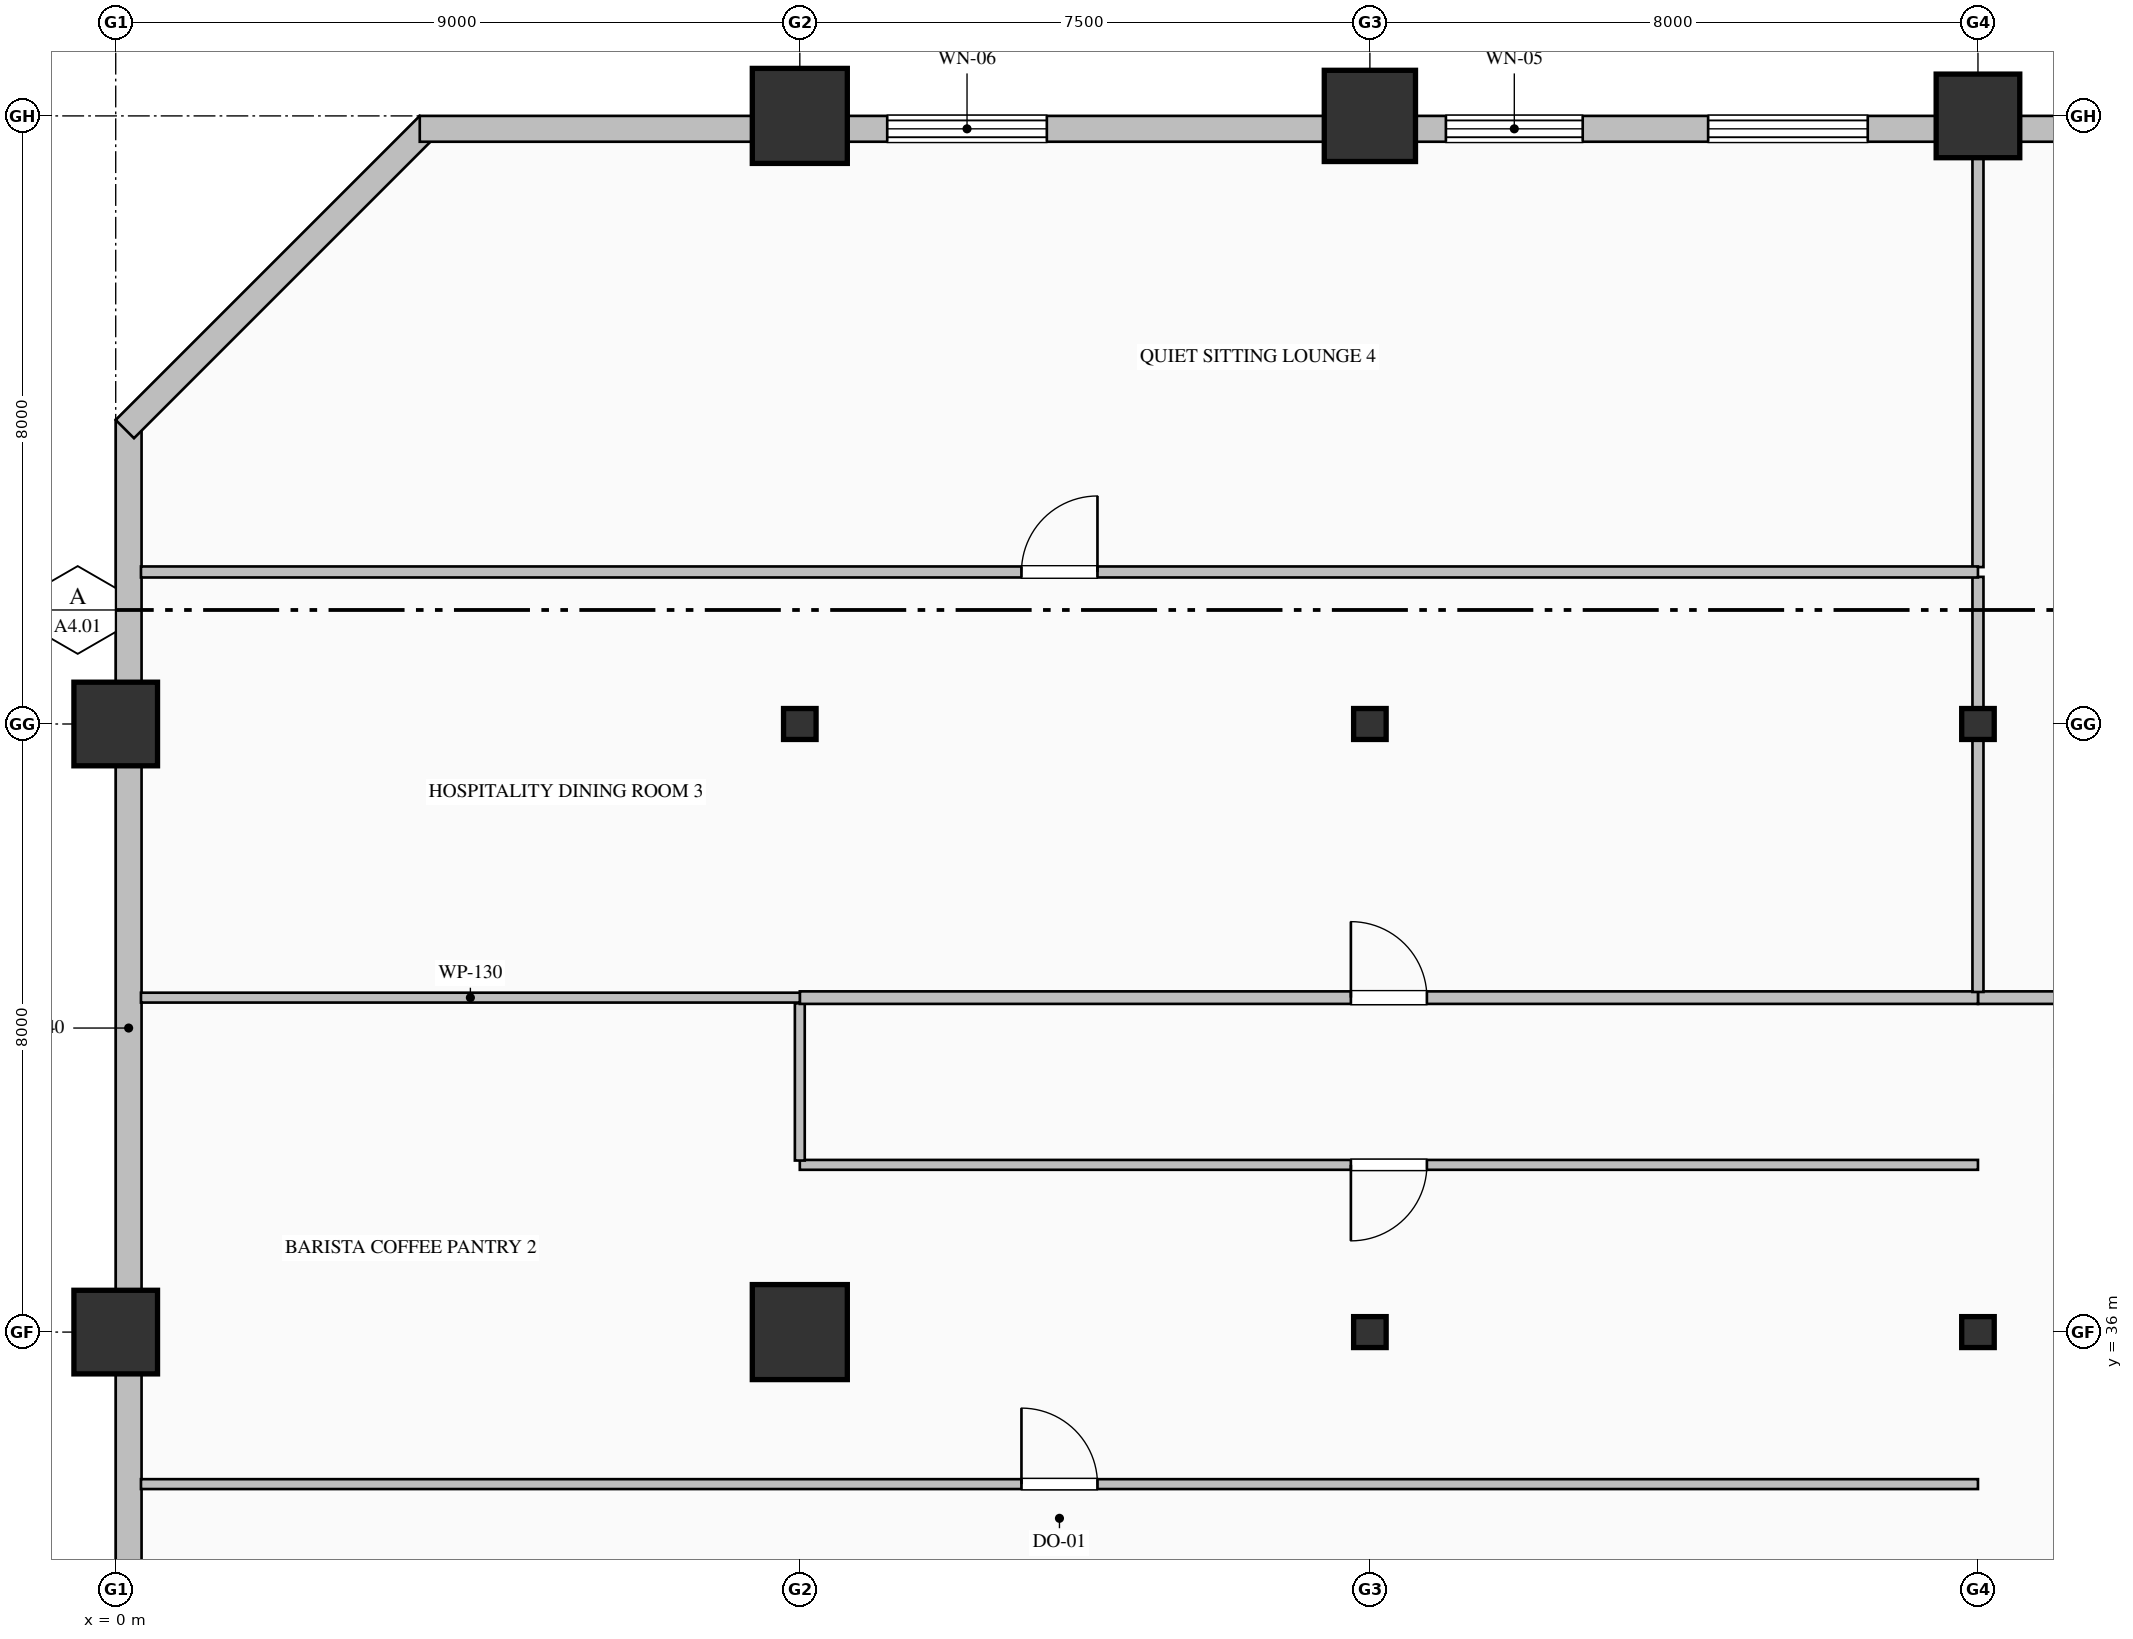
"""IFC4 building model, lengths in metres.
Left out: names, types, materials, properties, quantities, classifications, styles, units other than length and angle.
Written with IfcOpenShell. Run it as: python <this file> out.ifc"""

import sys

from ifc_helpers import new_model, si_unit, direction, frame, frame_2d, origin, origin_2d, place, context, subcontext, project, spatial, rectangle, hollow_rectangle, hollow_circle, i_section, extrude, element, fill, save


model = new_model("IFC4")
c1 = context("Model", 3, precision=1e-05, world=origin(), true_north=direction((0.0, 1.0)))
c2 = subcontext(c1, "Body", "Model", "MODEL_VIEW")
j1 = project(units=[si_unit("LENGTHUNIT", "METRE"), si_unit("PLANEANGLEUNIT", "RADIAN")], contexts=[c1])
p1 = place(None, origin())
s1 = spatial("IfcSite", under=j1, at=p1, CompositionType="ELEMENT")
p2 = place(p1, origin())
s2 = spatial("IfcBuilding", under=s1, at=p2, CompositionType="ELEMENT")
p3 = place(p2, frame((0.0, 0.0, 68.2)))
s3 = spatial("IfcBuildingStorey", under=s2, at=p3, CompositionType="ELEMENT", Elevation=68.2)
for number, where, z_axis, x_axis in (
    (1, (0.0, 36.0, 0.0), (0.0, 0.0, 1.0), (1.0, 0.0, 0.0)),
    (2, (0.0, 44.0, 0.0), (0.0, 0.0, 1.0), (1.0, 0.0, 0.0)),
):
    element("IfcColumn", number, at=place(p3, frame(where, z_axis=z_axis, x_axis=x_axis)), inside=s3, PredefinedType="COLUMN", context=c2, shape_type="SweptSolid", body=[
        extrude(hollow_rectangle(XDim=1.1, YDim=1.1, WallThickness=0.04, at=origin_2d()), origin(), (0.0, 0.0, 1.0), 4.0),
    ])
p4 = place(p3, frame((9.0, 36.0, 0.0), z_axis=(0.0, 0.0, 1.0), x_axis=(1.0, 0.0, 0.0)))
e3 = element("IfcColumn", 3, at=p4, inside=s3, PredefinedType="COLUMN", context=c2, shape_type="SweptSolid", body=[
    extrude(hollow_rectangle(XDim=1.25, YDim=1.25, WallThickness=0.045, at=origin_2d()), origin(), (0.0, 0.0, 1.0), 4.0),
])
p5 = place(p3, frame((9.0, 44.0, 0.0), z_axis=(0.0, 0.0, 1.0), x_axis=(1.0, 0.0, 0.0)))
e4 = element("IfcColumn", 4, at=p5, inside=s3, PredefinedType="COLUMN", context=c2, shape_type="SweptSolid", body=[
    extrude(i_section(OverallWidth=0.407, OverallDepth=0.428, WebThickness=0.02, FlangeThickness=0.035, FilletRadius=0.022, at=origin_2d()), origin(), (0.0, 0.0, 1.0), 4.0),
])
p6 = place(p3, frame((9.0, 52.0, 0.0), z_axis=(0.0, 0.0, 1.0), x_axis=(1.0, 0.0, 0.0)))
e5 = element("IfcColumn", 5, at=p6, inside=s3, PredefinedType="COLUMN", context=c2, shape_type="SweptSolid", body=[
    extrude(hollow_rectangle(XDim=1.25, YDim=1.25, WallThickness=0.045, at=origin_2d()), origin(), (0.0, 0.0, 1.0), 4.0),
])
for number, where, z_axis, x_axis in (
    (6, (16.5, 36.0, 0.0), (0.0, 0.0, 1.0), (1.0, 0.0, 0.0)),
    (7, (16.5, 44.0, 0.0), (0.0, 0.0, 1.0), (1.0, 0.0, 0.0)),
):
    element("IfcColumn", number, at=place(p3, frame(where, z_axis=z_axis, x_axis=x_axis)), inside=s3, PredefinedType="COLUMN", context=c2, shape_type="SweptSolid", body=[
        extrude(i_section(OverallWidth=0.407, OverallDepth=0.428, WebThickness=0.02, FlangeThickness=0.035, FilletRadius=0.022, at=origin_2d()), origin(), (0.0, 0.0, 1.0), 4.0),
    ])
p7 = place(p3, frame((16.5, 52.0, 0.0), z_axis=(0.0, 0.0, 1.0), x_axis=(1.0, 0.0, 0.0)))
e8 = element("IfcColumn", 8, at=p7, inside=s3, PredefinedType="COLUMN", context=c2, shape_type="SweptSolid", body=[
    extrude(hollow_circle(Radius=0.6, WallThickness=0.04, at=origin_2d()), origin(), (0.0, 0.0, 1.0), 4.0),
])
for number, where, z_axis, x_axis in (
    (9, (24.5, 36.0, 0.0), (0.0, 0.0, 1.0), (1.0, 0.0, 0.0)),
    (10, (24.5, 44.0, 0.0), (0.0, 0.0, 1.0), (1.0, 0.0, 0.0)),
):
    element("IfcColumn", number, at=place(p3, frame(where, z_axis=z_axis, x_axis=x_axis)), inside=s3, PredefinedType="COLUMN", context=c2, shape_type="SweptSolid", body=[
        extrude(i_section(OverallWidth=0.407, OverallDepth=0.428, WebThickness=0.02, FlangeThickness=0.035, FilletRadius=0.022, at=origin_2d()), origin(), (0.0, 0.0, 1.0), 4.0),
    ])
p8 = place(p3, frame((24.5, 52.0, 0.0), z_axis=(0.0, 0.0, 1.0), x_axis=(1.0, 0.0, 0.0)))
e11 = element("IfcColumn", 11, at=p8, inside=s3, PredefinedType="COLUMN", context=c2, shape_type="SweptSolid", body=[
    extrude(hollow_rectangle(XDim=1.1, YDim=1.1, WallThickness=0.04, at=origin_2d()), origin(), (0.0, 0.0, 1.0), 4.0),
])
p9 = place(p3, frame((0.17, 32.0, 0.0), z_axis=(0.0, 0.0, 1.0), x_axis=(0.0, 1.0, 0.0)))
e12 = element("IfcWall", 12, at=p9, inside=s3, PredefinedType="SOLIDWALL", context=c2, shape_type="SweptSolid", body=[
    extrude(rectangle(XDim=16.0, YDim=0.34, at=frame_2d((8.0, 0.0))), origin(), (0.0, 0.0, 1.0), 3.25),
])
p10 = place(p3, frame((0.12, 47.88, 0.0), z_axis=(0.0, 0.0, 1.0), x_axis=(0.707106781187, 0.707106781187, 0.0)))
e13 = element("IfcWall", 13, at=p10, inside=s3, PredefinedType="SOLIDWALL", context=c2, shape_type="SweptSolid", body=[
    extrude(rectangle(XDim=5.657, YDim=0.34, at=frame_2d((2.828, 0.0))), origin(), (0.0, 0.0, 1.0), 3.75),
])
p11 = place(p3, frame((4.0, 51.83, 0.0), z_axis=(0.0, 0.0, 1.0), x_axis=(1.0, 0.0, 0.0)))
e14 = element("IfcWall", 14, at=p11, inside=s3, PredefinedType="SOLIDWALL", context=c2, shape_type="SweptSolid", body=[
    extrude(rectangle(XDim=36.52, YDim=0.34, at=frame_2d((18.26, 0.0))), origin(), (0.0, 0.0, 1.0), 3.25),
])
p12 = place(p11, frame((6.15, 0.0, 0.85)))
e15 = element("IfcOpeningElement", 15, at=p12, cuts=e14, PredefinedType="OPENING", context=c2, shape_type="SweptSolid", body=[
    extrude(rectangle(XDim=2.1, YDim=2.05, at=frame_2d((1.05, 1.025))), frame((0.0, 0.18, 0.0), z_axis=(0.0, -1.0, 0.0), x_axis=(1.0, 0.0, 0.0)), (0.0, 0.0, 1.0), 0.36),
])
p13 = place(p11, frame((13.5, 0.0, 0.85)))
e16 = element("IfcOpeningElement", 16, at=p13, cuts=e14, PredefinedType="OPENING", context=c2, shape_type="SweptSolid", body=[
    extrude(rectangle(XDim=1.8, YDim=2.05, at=frame_2d((0.9, 1.025))), frame((0.0, 0.18, 0.0), z_axis=(0.0, -1.0, 0.0), x_axis=(1.0, 0.0, 0.0)), (0.0, 0.0, 1.0), 0.36),
])
p14 = place(p11, frame((16.95, 0.0, 0.85)))
e17 = element("IfcOpeningElement", 17, at=p14, cuts=e14, PredefinedType="OPENING", context=c2, shape_type="SweptSolid", body=[
    extrude(rectangle(XDim=2.1, YDim=2.05, at=frame_2d((1.05, 1.025))), frame((0.0, 0.18, 0.0), z_axis=(0.0, -1.0, 0.0), x_axis=(1.0, 0.0, 0.0)), (0.0, 0.0, 1.0), 0.36),
])
p15 = place(p11, frame((24.3, 0.0, 0.85)))
e18 = element("IfcOpeningElement", 18, at=p15, cuts=e14, PredefinedType="OPENING", context=c2, shape_type="SweptSolid", body=[
    extrude(rectangle(XDim=1.8, YDim=2.05, at=frame_2d((0.9, 1.025))), frame((0.0, 0.18, 0.0), z_axis=(0.0, -1.0, 0.0), x_axis=(1.0, 0.0, 0.0)), (0.0, 0.0, 1.0), 0.36),
])
p16 = place(p3, frame((24.5, 40.4, 0.0), z_axis=(0.0, 0.0, 1.0), x_axis=(1.0, 0.0, 0.0)))
e19 = element("IfcWall", 19, at=p16, inside=s3, PredefinedType="PARTITIONING", context=c2, shape_type="SweptSolid", body=[
    extrude(rectangle(XDim=13.3, YDim=0.165, at=frame_2d((6.65, 0.0))), origin(), (0.0, 0.0, 1.0), 3.75),
])
p17 = place(p16, frame((6.15, 0.0, 0.0)))
e20 = element("IfcOpeningElement", 20, at=p17, cuts=e19, PredefinedType="OPENING", context=c2, shape_type="SweptSolid", body=[
    extrude(rectangle(XDim=1.0, YDim=2.15, at=frame_2d((0.5, 1.075))), frame((0.0, 0.093, 0.0), z_axis=(0.0, -1.0, 0.0), x_axis=(1.0, 0.0, 0.0)), (0.0, 0.0, 1.0), 0.185),
])
p18 = place(p3, frame((24.5, 38.2, 0.0), z_axis=(0.0, 0.0, 1.0), x_axis=(-1.0, 0.0, 0.0)))
e21 = element("IfcWall", 21, at=p18, inside=s3, PredefinedType="PARTITIONING", context=c2, shape_type="SweptSolid", body=[
    extrude(rectangle(XDim=15.5, YDim=0.13, at=frame_2d((7.75, 0.0))), origin(), (0.0, 0.0, 1.0), 3.75),
])
p19 = place(p18, frame((7.25, 0.0, 0.0)))
e22 = element("IfcOpeningElement", 22, at=p19, cuts=e21, PredefinedType="OPENING", context=c2, shape_type="SweptSolid", body=[
    extrude(rectangle(XDim=1.0, YDim=2.15, at=frame_2d((0.5, 1.075))), frame((0.0, 0.075, 0.0), z_axis=(0.0, -1.0, 0.0), x_axis=(1.0, 0.0, 0.0)), (0.0, 0.0, 1.0), 0.15),
])
p20 = place(p3, frame((9.0, 38.257, 0.0), z_axis=(0.0, 0.0, 1.0), x_axis=(0.0, 1.0, 0.0)))
e23 = element("IfcWall", 23, at=p20, inside=s3, PredefinedType="PARTITIONING", context=c2, shape_type="SweptSolid", body=[
    extrude(rectangle(XDim=2.068, YDim=0.13, at=frame_2d((1.034, 0.0))), origin(), (0.0, 0.0, 1.0), 3.042),
])
p21 = place(p3, frame((9.0, 40.4, 0.0), z_axis=(0.0, 0.0, 1.0), x_axis=(1.0, 0.0, 0.0)))
e24 = element("IfcWall", 24, at=p21, inside=s3, PredefinedType="PARTITIONING", context=c2, shape_type="SweptSolid", body=[
    extrude(rectangle(XDim=15.5, YDim=0.165, at=frame_2d((7.75, 0.0))), origin(), (0.0, 0.0, 1.0), 3.75),
])
p22 = place(p21, frame((7.25, 0.0, 0.0)))
e25 = element("IfcOpeningElement", 25, at=p22, cuts=e24, PredefinedType="OPENING", context=c2, shape_type="SweptSolid", body=[
    extrude(rectangle(XDim=1.0, YDim=2.15, at=frame_2d((0.5, 1.075))), frame((0.0, 0.093, 0.0), z_axis=(0.0, -1.0, 0.0), x_axis=(1.0, 0.0, 0.0)), (0.0, 0.0, 1.0), 0.185),
])
p23 = place(p3, frame((24.5, 40.475, 0.0), z_axis=(0.0, 0.0, 1.0), x_axis=(0.0, 1.0, 0.0)))
e26 = element("IfcWall", 26, at=p23, inside=s3, PredefinedType="PARTITIONING", context=c2, shape_type="SweptSolid", body=[
    extrude(rectangle(XDim=5.461, YDim=0.145, at=frame_2d((2.73, 0.0))), origin(), (0.0, 0.0, 1.0), 3.042),
])
p24 = place(p3, frame((24.5, 46.064, 0.0), z_axis=(0.0, 0.0, 1.0), x_axis=(0.0, 1.0, 0.0)))
e27 = element("IfcWall", 27, at=p24, inside=s3, PredefinedType="PARTITIONING", context=c2, shape_type="SweptSolid", body=[
    extrude(rectangle(XDim=5.604, YDim=0.145, at=frame_2d((2.802, 0.0))), origin(), (0.0, 0.0, 1.0), 3.042),
])
p25 = place(p3, frame((0.332, 34.0, 0.0), z_axis=(0.0, 0.0, 1.0), x_axis=(1.0, 0.0, 0.0)))
e28 = element("IfcWall", 28, at=p25, inside=s3, PredefinedType="PARTITIONING", context=c2, shape_type="SweptSolid", body=[
    extrude(rectangle(XDim=24.168, YDim=0.13, at=frame_2d((12.084, 0.0))), origin(), (0.0, 0.0, 1.0), 3.75),
])
p26 = place(p25, frame((11.584, 0.0, 0.0)))
e29 = element("IfcOpeningElement", 29, at=p26, cuts=e28, PredefinedType="OPENING", context=c2, shape_type="SweptSolid", body=[
    extrude(rectangle(XDim=1.0, YDim=2.15, at=frame_2d((0.5, 1.075))), frame((0.0, 0.075, 0.0), z_axis=(0.0, -1.0, 0.0), x_axis=(1.0, 0.0, 0.0)), (0.0, 0.0, 1.0), 0.15),
])
p27 = place(p3, frame((0.332, 40.4, 0.0), z_axis=(0.0, 0.0, 1.0), x_axis=(1.0, 0.0, 0.0)))
e30 = element("IfcWall", 30, at=p27, inside=s3, PredefinedType="PARTITIONING", context=c2, shape_type="SweptSolid", body=[
    extrude(rectangle(XDim=8.668, YDim=0.13, at=frame_2d((4.334, 0.0))), origin(), (0.0, 0.0, 1.0), 3.75),
])
p28 = place(p3, frame((0.332, 46.0, 0.0), z_axis=(0.0, 0.0, 1.0), x_axis=(1.0, 0.0, 0.0)))
e31 = element("IfcWall", 31, at=p28, inside=s3, PredefinedType="PARTITIONING", context=c2, shape_type="SweptSolid", body=[
    extrude(rectangle(XDim=24.168, YDim=0.145, at=frame_2d((12.084, 0.0))), origin(), (0.0, 0.0, 1.0), 3.75),
])
p29 = place(p28, frame((11.584, 0.0, 0.0)))
e32 = element("IfcOpeningElement", 32, at=p29, cuts=e31, PredefinedType="OPENING", context=c2, shape_type="SweptSolid", body=[
    extrude(rectangle(XDim=1.0, YDim=2.15, at=frame_2d((0.5, 1.075))), frame((0.0, 0.083, 0.0), z_axis=(0.0, -1.0, 0.0), x_axis=(1.0, 0.0, 0.0)), (0.0, 0.0, 1.0), 0.165),
])
p30 = place(p12, origin())
e33 = element("IfcWindow", 33, at=p30, inside=s3, PartitioningType="TRIPLE_PANEL_VERTICAL", PredefinedType="WINDOW", context=c2, shape_type="SweptSolid", body=[
    extrude(rectangle(XDim=2.1, YDim=2.05, at=frame_2d((1.05, 1.025))), frame((0.0, 0.15, 0.0), z_axis=(0.0, -1.0, 0.0), x_axis=(1.0, 0.0, 0.0)), (0.0, 0.0, 1.0), 0.06),
])
fill(e15, e33)
p31 = place(p13, origin())
e34 = element("IfcWindow", 34, at=p31, inside=s3, PartitioningType="TRIPLE_PANEL_VERTICAL", PredefinedType="WINDOW", context=c2, shape_type="SweptSolid", body=[
    extrude(rectangle(XDim=1.8, YDim=2.05, at=frame_2d((0.9, 1.025))), frame((0.0, 0.15, 0.0), z_axis=(0.0, -1.0, 0.0), x_axis=(1.0, 0.0, 0.0)), (0.0, 0.0, 1.0), 0.06),
])
fill(e16, e34)
p32 = place(p14, origin())
e35 = element("IfcWindow", 35, at=p32, inside=s3, PartitioningType="TRIPLE_PANEL_VERTICAL", PredefinedType="WINDOW", context=c2, shape_type="SweptSolid", body=[
    extrude(rectangle(XDim=2.1, YDim=2.05, at=frame_2d((1.05, 1.025))), frame((0.0, 0.15, 0.0), z_axis=(0.0, -1.0, 0.0), x_axis=(1.0, 0.0, 0.0)), (0.0, 0.0, 1.0), 0.06),
])
fill(e17, e35)
p33 = place(p26, origin())
e36 = element("IfcDoor", 36, at=p33, inside=s3, OperationType="SINGLE_SWING_LEFT", PredefinedType="DOOR", context=c2, shape_type="SweptSolid", body=[
    extrude(rectangle(XDim=1.0, YDim=2.15, at=frame_2d((0.5, 1.075))), frame((0.0, 0.025, 0.0), z_axis=(0.0, -1.0, 0.0), x_axis=(1.0, 0.0, 0.0)), (0.0, 0.0, 1.0), 0.05),
])
fill(e29, e36)
p34 = place(p19, origin())
e37 = element("IfcDoor", 37, at=p34, inside=s3, OperationType="SINGLE_SWING_RIGHT", PredefinedType="DOOR", context=c2, shape_type="SweptSolid", body=[
    extrude(rectangle(XDim=1.0, YDim=2.15, at=frame_2d((0.5, 1.075))), frame((0.0, 0.025, 0.0), z_axis=(0.0, -1.0, 0.0), x_axis=(1.0, 0.0, 0.0)), (0.0, 0.0, 1.0), 0.05),
])
fill(e22, e37)
p35 = place(p22, origin())
e38 = element("IfcDoor", 38, at=p35, inside=s3, OperationType="SINGLE_SWING_LEFT", PredefinedType="DOOR", context=c2, shape_type="SweptSolid", body=[
    extrude(rectangle(XDim=1.0, YDim=2.15, at=frame_2d((0.5, 1.075))), frame((0.0, 0.025, 0.0), z_axis=(0.0, -1.0, 0.0), x_axis=(1.0, 0.0, 0.0)), (0.0, 0.0, 1.0), 0.05),
])
fill(e25, e38)
p36 = place(p29, origin())
e39 = element("IfcDoor", 39, at=p36, inside=s3, OperationType="SINGLE_SWING_RIGHT", PredefinedType="DOOR", context=c2, shape_type="SweptSolid", body=[
    extrude(rectangle(XDim=1.0, YDim=2.15, at=frame_2d((0.5, 1.075))), frame((0.0, 0.025, 0.0), z_axis=(0.0, -1.0, 0.0), x_axis=(1.0, 0.0, 0.0)), (0.0, 0.0, 1.0), 0.05),
])
fill(e32, e39)
save(model, sys.argv[1])
